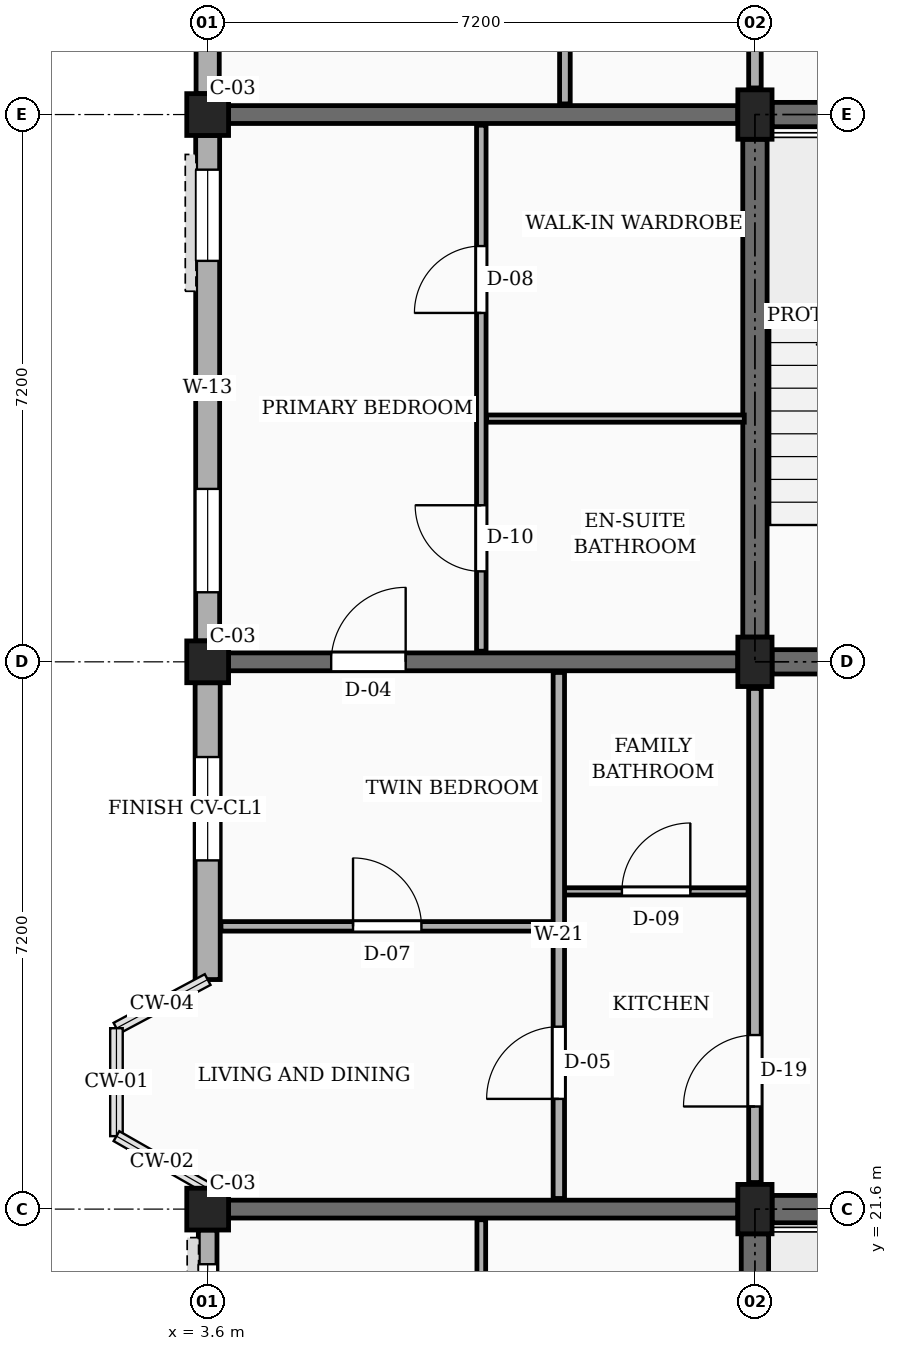
"""IFC4 building model, lengths in metres.
Left out: names, types, materials, properties, quantities, classifications, styles, units other than length and angle.
Written with IfcOpenShell. Run it as: python <this file> out.ifc"""

import sys

from ifc_helpers import new_model, si_unit, direction, frame, frame_2d, origin, origin_2d, place, context, subcontext, project, spatial, rectangle, extrude, element, fill, save


model = new_model("IFC4")
c1 = context("Model", 3, precision=1e-05, world=origin(), true_north=direction((0.0, 1.0)))
c2 = subcontext(c1, "Body", "Model", "MODEL_VIEW")
j1 = project(units=[si_unit("LENGTHUNIT", "METRE"), si_unit("PLANEANGLEUNIT", "RADIAN")], contexts=[c1])
p1 = place(None, origin())
s1 = spatial("IfcSite", under=j1, at=p1, CompositionType="ELEMENT")
p2 = place(p1, origin())
s2 = spatial("IfcBuilding", under=s1, at=p2, CompositionType="ELEMENT")
p3 = place(p2, frame((0.0, 0.0, 17.1)))
s3 = spatial("IfcBuildingStorey", under=s2, at=p3, CompositionType="ELEMENT", Elevation=17.1)
for number, where, z_axis, x_axis in (
    (1, (3.6, 21.6, 0.0), (0.0, 0.0, 1.0), (1.0, 0.0, 0.0)),
    (2, (3.6, 28.8, 0.0), (0.0, 0.0, 1.0), (1.0, 0.0, 0.0)),
    (3, (3.6, 36.0, 0.0), (0.0, 0.0, 1.0), (1.0, 0.0, 0.0)),
):
    element("IfcColumn", number, at=place(p3, frame(where, z_axis=z_axis, x_axis=x_axis)), inside=s3, PredefinedType="COLUMN", context=c2, shape_type="SweptSolid", body=[
        extrude(rectangle(XDim=0.55, YDim=0.55, at=origin_2d()), origin(), (0.0, 0.0, 1.0), 3.15),
    ])
for number, where, z_axis, x_axis in (
    (4, (10.8, 21.6, 0.0), (0.0, 0.0, 1.0), (1.0, 0.0, 0.0)),
    (5, (10.8, 28.8, 0.0), (0.0, 0.0, 1.0), (1.0, 0.0, 0.0)),
    (6, (10.8, 36.0, 0.0), (0.0, 0.0, 1.0), (1.0, 0.0, 0.0)),
):
    element("IfcColumn", number, at=place(p3, frame(where, z_axis=z_axis, x_axis=x_axis)), inside=s3, PredefinedType="COLUMN", context=c2, shape_type="SweptSolid", body=[
        extrude(rectangle(XDim=0.45, YDim=0.65, at=origin_2d()), origin(), (0.0, 0.0, 1.0), 3.15),
    ])
p4 = place(p3, frame((3.875, 21.6, 0.0), z_axis=(0.0, 0.0, 1.0), x_axis=(1.0, 0.0, 0.0)))
e7 = element("IfcWall", 7, at=p4, inside=s3, PredefinedType="SOLIDWALL", context=c2, shape_type="SweptSolid", body=[
    extrude(rectangle(XDim=6.7, YDim=0.235, at=frame_2d((3.35, 0.0))), origin(), (0.0, 0.0, 1.0), 2.17),
])
p5 = place(p3, frame((3.875, 28.8, 0.0), z_axis=(0.0, 0.0, 1.0), x_axis=(1.0, 0.0, 0.0)))
e8 = element("IfcWall", 8, at=p5, inside=s3, PredefinedType="SOLIDWALL", context=c2, shape_type="SweptSolid", body=[
    extrude(rectangle(XDim=6.7, YDim=0.235, at=frame_2d((3.35, 0.0))), origin(), (0.0, 0.0, 1.0), 2.17),
])
p6 = place(p5, frame((1.35, 0.0, 0.0)))
e9 = element("IfcOpeningElement", 9, at=p6, cuts=e8, PredefinedType="OPENING", context=c2, shape_type="SweptSolid", body=[
    extrude(rectangle(XDim=0.98, YDim=2.12, at=frame_2d((0.49, 1.06))), frame((0.0, 0.127, 0.0), z_axis=(0.0, -1.0, 0.0), x_axis=(1.0, 0.0, 0.0)), (0.0, 0.0, 1.0), 0.255),
])
p7 = place(p3, frame((3.875, 36.0, 0.0), z_axis=(0.0, 0.0, 1.0), x_axis=(1.0, 0.0, 0.0)))
e10 = element("IfcWall", 10, at=p7, inside=s3, PredefinedType="SOLIDWALL", context=c2, shape_type="SweptSolid", body=[
    extrude(rectangle(XDim=6.7, YDim=0.235, at=frame_2d((3.35, 0.0))), origin(), (0.0, 0.0, 1.0), 2.17),
])
p8 = place(p3, frame((3.6, 42.925, 0.0), z_axis=(0.0, 0.0, 1.0), x_axis=(0.0, -1.0, 0.0)))
e11 = element("IfcWall", 11, at=p8, inside=s3, PredefinedType="SOLIDWALL", context=c2, shape_type="SweptSolid", body=[
    extrude(rectangle(XDim=6.65, YDim=0.305, at=frame_2d((3.325, 0.0))), origin(), (0.0, 0.0, 1.0), 2.44),
])
p9 = place(p8, frame((0.45, 0.0, 0.78)))
e12 = element("IfcOpeningElement", 12, at=p9, cuts=e11, PredefinedType="OPENING", context=c2, shape_type="SweptSolid", body=[
    extrude(rectangle(XDim=1.04, YDim=1.26, at=frame_2d((0.52, 0.63))), frame((0.0, 0.163, 0.0), z_axis=(0.0, -1.0, 0.0), x_axis=(1.0, 0.0, 0.0)), (0.0, 0.0, 1.0), 0.325),
])
p10 = place(p8, frame((4.65, 0.0, 0.78)))
e13 = element("IfcOpeningElement", 13, at=p10, cuts=e11, PredefinedType="OPENING", context=c2, shape_type="SweptSolid", body=[
    extrude(rectangle(XDim=1.2, YDim=1.26, at=frame_2d((0.6, 0.63))), frame((0.0, 0.163, 0.0), z_axis=(0.0, -1.0, 0.0), x_axis=(1.0, 0.0, 0.0)), (0.0, 0.0, 1.0), 0.325),
])
p11 = place(p3, frame((3.6, 35.725, 0.0), z_axis=(0.0, 0.0, 1.0), x_axis=(0.0, -1.0, 0.0)))
e14 = element("IfcWall", 14, at=p11, inside=s3, PredefinedType="SOLIDWALL", context=c2, shape_type="SweptSolid", body=[
    extrude(rectangle(XDim=6.65, YDim=0.315, at=frame_2d((3.325, 0.0))), origin(), (0.0, 0.0, 1.0), 2.44),
])
p12 = place(p11, frame((0.45, 0.0, 0.78)))
e15 = element("IfcOpeningElement", 15, at=p12, cuts=e14, PredefinedType="OPENING", context=c2, shape_type="SweptSolid", body=[
    extrude(rectangle(XDim=1.2, YDim=1.26, at=frame_2d((0.6, 0.63))), frame((0.0, 0.167, 0.0), z_axis=(0.0, -1.0, 0.0), x_axis=(1.0, 0.0, 0.0)), (0.0, 0.0, 1.0), 0.335),
])
p13 = place(p11, frame((4.65, 0.0, 0.78)))
e16 = element("IfcOpeningElement", 16, at=p13, cuts=e14, PredefinedType="OPENING", context=c2, shape_type="SweptSolid", body=[
    extrude(rectangle(XDim=1.36, YDim=1.26, at=frame_2d((0.68, 0.63))), frame((0.0, 0.167, 0.0), z_axis=(0.0, -1.0, 0.0), x_axis=(1.0, 0.0, 0.0)), (0.0, 0.0, 1.0), 0.335),
])
p14 = place(p3, frame((3.6, 28.525, 0.0), z_axis=(0.0, 0.0, 1.0), x_axis=(0.0, -1.0, 0.0)))
e17 = element("IfcWall", 17, at=p14, inside=s3, PredefinedType="SOLIDWALL", context=c2, shape_type="SweptSolid", body=[
    extrude(rectangle(XDim=3.905, YDim=0.33, at=frame_2d((1.952, 0.0))), origin(), (0.0, 0.0, 1.0), 2.44),
])
p15 = place(p14, frame((0.978, 0.0, 0.78)))
e18 = element("IfcOpeningElement", 18, at=p15, cuts=e17, PredefinedType="OPENING", context=c2, shape_type="SweptSolid", body=[
    extrude(rectangle(XDim=1.36, YDim=1.26, at=frame_2d((0.68, 0.63))), frame((0.0, 0.175, 0.0), z_axis=(0.0, -1.0, 0.0), x_axis=(1.0, 0.0, 0.0)), (0.0, 0.0, 1.0), 0.35),
])
p16 = place(p3, frame((3.6, 21.325, 0.0), z_axis=(0.0, 0.0, 1.0), x_axis=(0.0, -1.0, 0.0)))
e19 = element("IfcWall", 19, at=p16, inside=s3, PredefinedType="SOLIDWALL", context=c2, shape_type="SweptSolid", body=[
    extrude(rectangle(XDim=6.65, YDim=0.245, at=frame_2d((3.325, 0.0))), origin(), (0.0, 0.0, 1.0), 2.44),
])
p17 = place(p16, frame((0.45, 0.0, 0.78)))
e20 = element("IfcOpeningElement", 20, at=p17, cuts=e19, PredefinedType="OPENING", context=c2, shape_type="SweptSolid", body=[
    extrude(rectangle(XDim=1.44, YDim=1.26, at=frame_2d((0.72, 0.63))), frame((0.0, 0.133, 0.0), z_axis=(0.0, -1.0, 0.0), x_axis=(1.0, 0.0, 0.0)), (0.0, 0.0, 1.0), 0.265),
])
p18 = place(p16, frame((4.65, 0.0, 0.78)))
e21 = element("IfcOpeningElement", 21, at=p18, cuts=e19, PredefinedType="OPENING", context=c2, shape_type="SweptSolid", body=[
    extrude(rectangle(XDim=0.98, YDim=1.36, at=frame_2d((0.49, 0.68))), frame((0.0, 0.133, 0.0), z_axis=(0.0, -1.0, 0.0), x_axis=(1.0, 0.0, 0.0)), (0.0, 0.0, 1.0), 0.265),
])
p19 = place(p3, frame((10.8, 14.725, 0.0), z_axis=(0.0, 0.0, 1.0), x_axis=(0.0, 1.0, 0.0)))
e22 = element("IfcWall", 22, at=p19, inside=s3, PredefinedType="SHEAR", context=c2, shape_type="SweptSolid", body=[
    extrude(rectangle(XDim=6.55, YDim=0.36, at=frame_2d((3.275, 0.0))), origin(), (0.0, 0.0, 1.0), 2.87),
])
p20 = place(p3, frame((11.025, 21.6, 0.0), z_axis=(0.0, 0.0, 1.0), x_axis=(1.0, 0.0, 0.0)))
e23 = element("IfcWall", 23, at=p20, inside=s3, PredefinedType="SHEAR", context=c2, shape_type="SweptSolid", body=[
    extrude(rectangle(XDim=6.75, YDim=0.36, at=frame_2d((3.375, 0.0))), origin(), (0.0, 0.0, 1.0), 2.87),
])
p21 = place(p3, frame((10.8, 29.125, 0.0), z_axis=(0.0, 0.0, 1.0), x_axis=(0.0, 1.0, 0.0)))
e24 = element("IfcWall", 24, at=p21, inside=s3, PredefinedType="SHEAR", context=c2, shape_type="SweptSolid", body=[
    extrude(rectangle(XDim=6.55, YDim=0.32, at=frame_2d((3.275, 0.0))), origin(), (0.0, 0.0, 1.0), 2.87),
])
for number, where, z_axis, x_axis in (
    (25, (11.025, 36.0, 0.0), (0.0, 0.0, 1.0), (1.0, 0.0, 0.0)),
    (26, (11.025, 28.8, 0.0), (0.0, 0.0, 1.0), (1.0, 0.0, 0.0)),
):
    element("IfcWall", number, at=place(p3, frame(where, z_axis=z_axis, x_axis=x_axis)), inside=s3, PredefinedType="SHEAR", context=c2, shape_type="SweptSolid", body=[
        extrude(rectangle(XDim=6.75, YDim=0.32, at=frame_2d((3.375, 0.0))), origin(), (0.0, 0.0, 1.0), 2.87),
    ])
p22 = place(p3, frame((10.8, 21.95, 0.0), z_axis=(0.0, 0.0, 1.0), x_axis=(0.0, 1.0, 0.0)))
e27 = element("IfcWall", 27, at=p22, inside=s3, PredefinedType="PARTITIONING", context=c2, shape_type="SweptSolid", body=[
    extrude(rectangle(XDim=6.5, YDim=0.165, at=frame_2d((3.25, 0.0))), origin(), (0.0, 0.0, 1.0), 2.305),
])
p23 = place(p22, frame((1.0, 0.0, 0.0)))
e28 = element("IfcOpeningElement", 28, at=p23, cuts=e27, PredefinedType="OPENING", context=c2, shape_type="SweptSolid", body=[
    extrude(rectangle(XDim=0.94, YDim=2.12, at=frame_2d((0.47, 1.06))), frame((0.0, 0.093, 0.0), z_axis=(0.0, -1.0, 0.0), x_axis=(1.0, 0.0, 0.0)), (0.0, 0.0, 1.0), 0.185),
])
p24 = place(p3, frame((10.8, 36.35, 0.0), z_axis=(0.0, 0.0, 1.0), x_axis=(0.0, 1.0, 0.0)))
e29 = element("IfcWall", 29, at=p24, inside=s3, PredefinedType="PARTITIONING", context=c2, shape_type="SweptSolid", body=[
    extrude(rectangle(XDim=6.5, YDim=0.165, at=frame_2d((3.25, 0.0))), origin(), (0.0, 0.0, 1.0), 2.305),
])
p25 = place(p24, frame((1.0, 0.0, 0.0)))
e30 = element("IfcOpeningElement", 30, at=p25, cuts=e29, PredefinedType="OPENING", context=c2, shape_type="SweptSolid", body=[
    extrude(rectangle(XDim=1.14, YDim=2.18, at=frame_2d((0.57, 1.09))), frame((0.0, 0.093, 0.0), z_axis=(0.0, -1.0, 0.0), x_axis=(1.0, 0.0, 0.0)), (0.0, 0.0, 1.0), 0.185),
])
p26 = place(p3, frame((7.2, 14.54, 0.0), z_axis=(0.0, 0.0, 1.0), x_axis=(0.0, 1.0, 0.0)))
e31 = element("IfcWall", 31, at=p26, inside=s3, PredefinedType="PARTITIONING", context=c2, shape_type="SweptSolid", body=[
    extrude(rectangle(XDim=6.92, YDim=0.115, at=frame_2d((3.46, 0.0))), origin(), (0.0, 0.0, 1.0), 2.305),
])
p27 = place(p26, frame((1.05, 0.0, 0.0)))
e32 = element("IfcOpeningElement", 32, at=p27, cuts=e31, PredefinedType="OPENING", context=c2, shape_type="SweptSolid", body=[
    extrude(rectangle(XDim=0.87, YDim=2.05, at=frame_2d((0.435, 1.025))), frame((0.0, 0.067, 0.0), z_axis=(0.0, -1.0, 0.0), x_axis=(1.0, 0.0, 0.0)), (0.0, 0.0, 1.0), 0.135),
])
p28 = place(p26, frame((4.45, 0.0, 0.0)))
e33 = element("IfcOpeningElement", 33, at=p28, cuts=e31, PredefinedType="OPENING", context=c2, shape_type="SweptSolid", body=[
    extrude(rectangle(XDim=0.88, YDim=2.08, at=frame_2d((0.44, 1.04))), frame((0.0, 0.067, 0.0), z_axis=(0.0, -1.0, 0.0), x_axis=(1.0, 0.0, 0.0)), (0.0, 0.0, 1.0), 0.135),
])
p29 = place(p3, frame((3.775, 25.32, 0.0), z_axis=(0.0, 0.0, 1.0), x_axis=(1.0, 0.0, 0.0)))
e34 = element("IfcWall", 34, at=p29, inside=s3, PredefinedType="PARTITIONING", context=c2, shape_type="SweptSolid", body=[
    extrude(rectangle(XDim=4.375, YDim=0.125, at=frame_2d((2.188, 0.0))), origin(), (0.0, 0.0, 1.0), 2.305),
])
p30 = place(p29, frame((1.738, 0.0, 0.0)))
e35 = element("IfcOpeningElement", 35, at=p30, cuts=e34, PredefinedType="OPENING", context=c2, shape_type="SweptSolid", body=[
    extrude(rectangle(XDim=0.9, YDim=2.1, at=frame_2d((0.45, 1.05))), frame((0.0, 0.073, 0.0), z_axis=(0.0, -1.0, 0.0), x_axis=(1.0, 0.0, 0.0)), (0.0, 0.0, 1.0), 0.145),
])
p31 = place(p3, frame((8.29, 25.78, 0.0), z_axis=(0.0, 0.0, 1.0), x_axis=(1.0, 0.0, 0.0)))
e36 = element("IfcWall", 36, at=p31, inside=s3, PredefinedType="PARTITIONING", context=c2, shape_type="SweptSolid", body=[
    extrude(rectangle(XDim=2.42, YDim=0.095, at=frame_2d((1.21, 0.0))), origin(), (0.0, 0.0, 1.0), 2.305),
])
p32 = place(p31, frame((0.76, 0.0, 0.0)))
e37 = element("IfcOpeningElement", 37, at=p32, cuts=e36, PredefinedType="OPENING", context=c2, shape_type="SweptSolid", body=[
    extrude(rectangle(XDim=0.9, YDim=2.05, at=frame_2d((0.45, 1.025))), frame((0.0, 0.058, 0.0), z_axis=(0.0, -1.0, 0.0), x_axis=(1.0, 0.0, 0.0)), (0.0, 0.0, 1.0), 0.115),
])
p33 = place(p3, frame((8.22, 21.74, 0.0), z_axis=(0.0, 0.0, 1.0), x_axis=(0.0, 1.0, 0.0)))
e38 = element("IfcWall", 38, at=p33, inside=s3, PredefinedType="PARTITIONING", context=c2, shape_type="SweptSolid", body=[
    extrude(rectangle(XDim=6.92, YDim=0.15, at=frame_2d((3.46, 0.0))), origin(), (0.0, 0.0, 1.0), 2.305),
])
p34 = place(p33, frame((1.31, 0.0, 0.0)))
e39 = element("IfcOpeningElement", 39, at=p34, cuts=e38, PredefinedType="OPENING", context=c2, shape_type="SweptSolid", body=[
    extrude(rectangle(XDim=0.95, YDim=2.1, at=frame_2d((0.475, 1.05))), frame((0.0, 0.085, 0.0), z_axis=(0.0, -1.0, 0.0), x_axis=(1.0, 0.0, 0.0)), (0.0, 0.0, 1.0), 0.17),
])
p35 = place(p3, frame((7.2, 28.94, 0.0), z_axis=(0.0, 0.0, 1.0), x_axis=(0.0, 1.0, 0.0)))
e40 = element("IfcWall", 40, at=p35, inside=s3, PredefinedType="PARTITIONING", context=c2, shape_type="SweptSolid", body=[
    extrude(rectangle(XDim=6.92, YDim=0.125, at=frame_2d((3.46, 0.0))), origin(), (0.0, 0.0, 1.0), 2.305),
])
p36 = place(p35, frame((1.05, 0.0, 0.0)))
e41 = element("IfcOpeningElement", 41, at=p36, cuts=e40, PredefinedType="OPENING", context=c2, shape_type="SweptSolid", body=[
    extrude(rectangle(XDim=0.87, YDim=2.05, at=frame_2d((0.435, 1.025))), frame((0.0, 0.073, 0.0), z_axis=(0.0, -1.0, 0.0), x_axis=(1.0, 0.0, 0.0)), (0.0, 0.0, 1.0), 0.145),
])
p37 = place(p35, frame((4.45, 0.0, 0.0)))
e42 = element("IfcOpeningElement", 42, at=p37, cuts=e40, PredefinedType="OPENING", context=c2, shape_type="SweptSolid", body=[
    extrude(rectangle(XDim=0.88, YDim=2.08, at=frame_2d((0.44, 1.04))), frame((0.0, 0.073, 0.0), z_axis=(0.0, -1.0, 0.0), x_axis=(1.0, 0.0, 0.0)), (0.0, 0.0, 1.0), 0.145),
])
p38 = place(p3, frame((7.27, 32.0, 0.0), z_axis=(0.0, 0.0, 1.0), x_axis=(1.0, 0.0, 0.0)))
e43 = element("IfcWall", 43, at=p38, inside=s3, PredefinedType="PARTITIONING", context=c2, shape_type="SweptSolid", body=[
    extrude(rectangle(XDim=3.39, YDim=0.095, at=frame_2d((1.695, 0.0))), origin(), (0.0, 0.0, 1.0), 2.305),
])
p39 = place(p3, frame((8.3, 36.14, 0.0), z_axis=(0.0, 0.0, 1.0), x_axis=(0.0, 1.0, 0.0)))
e44 = element("IfcWall", 44, at=p39, inside=s3, PredefinedType="PARTITIONING", context=c2, shape_type="SweptSolid", body=[
    extrude(rectangle(XDim=6.92, YDim=0.14, at=frame_2d((3.46, 0.0))), origin(), (0.0, 0.0, 1.0), 2.305),
])
p40 = place(p39, frame((1.31, 0.0, 0.0)))
e45 = element("IfcOpeningElement", 45, at=p40, cuts=e44, PredefinedType="OPENING", context=c2, shape_type="SweptSolid", body=[
    extrude(rectangle(XDim=0.95, YDim=2.1, at=frame_2d((0.475, 1.05))), frame((0.0, 0.08, 0.0), z_axis=(0.0, -1.0, 0.0), x_axis=(1.0, 0.0, 0.0)), (0.0, 0.0, 1.0), 0.16),
])
p41 = place(p12, origin())
e46 = element("IfcWindow", 46, at=p41, inside=s3, PartitioningType="SINGLE_PANEL", PredefinedType="WINDOW", context=c2, shape_type="SweptSolid", body=[
    extrude(rectangle(XDim=1.2, YDim=1.26, at=frame_2d((0.6, 0.63))), frame((0.0, 0.03, 0.0), z_axis=(0.0, -1.0, 0.0), x_axis=(1.0, 0.0, 0.0)), (0.0, 0.0, 1.0), 0.06),
])
fill(e15, e46)
p42 = place(p13, origin())
e47 = element("IfcWindow", 47, at=p42, inside=s3, PartitioningType="SINGLE_PANEL", PredefinedType="WINDOW", context=c2, shape_type="SweptSolid", body=[
    extrude(rectangle(XDim=1.36, YDim=1.26, at=frame_2d((0.68, 0.63))), frame((0.0, 0.03, 0.0), z_axis=(0.0, -1.0, 0.0), x_axis=(1.0, 0.0, 0.0)), (0.0, 0.0, 1.0), 0.06),
])
fill(e16, e47)
p43 = place(p15, origin())
e48 = element("IfcWindow", 48, at=p43, inside=s3, PartitioningType="SINGLE_PANEL", PredefinedType="WINDOW", context=c2, shape_type="SweptSolid", body=[
    extrude(rectangle(XDim=1.36, YDim=1.26, at=frame_2d((0.68, 0.63))), frame((0.0, 0.03, 0.0), z_axis=(0.0, -1.0, 0.0), x_axis=(1.0, 0.0, 0.0)), (0.0, 0.0, 1.0), 0.06),
])
fill(e18, e48)
p44 = place(p17, origin())
e49 = element("IfcWindow", 49, at=p44, inside=s3, PartitioningType="SINGLE_PANEL", PredefinedType="WINDOW", context=c2, shape_type="SweptSolid", body=[
    extrude(rectangle(XDim=1.44, YDim=1.26, at=frame_2d((0.72, 0.63))), frame((0.0, 0.03, 0.0), z_axis=(0.0, -1.0, 0.0), x_axis=(1.0, 0.0, 0.0)), (0.0, 0.0, 1.0), 0.06),
])
fill(e20, e49)
p45 = place(p23, origin())
e50 = element("IfcDoor", 50, at=p45, inside=s3, OperationType="SINGLE_SWING_LEFT", PredefinedType="DOOR", context=c2, shape_type="SweptSolid", body=[
    extrude(rectangle(XDim=0.94, YDim=2.12, at=frame_2d((0.47, 1.06))), frame((0.0, 0.025, 0.0), z_axis=(0.0, -1.0, 0.0), x_axis=(1.0, 0.0, 0.0)), (0.0, 0.0, 1.0), 0.05),
])
fill(e28, e50)
p46 = place(p30, origin())
e51 = element("IfcDoor", 51, at=p46, inside=s3, OperationType="SINGLE_SWING_LEFT", PredefinedType="DOOR", context=c2, shape_type="SweptSolid", body=[
    extrude(rectangle(XDim=0.9, YDim=2.1, at=frame_2d((0.45, 1.05))), frame((0.0, 0.025, 0.0), z_axis=(0.0, -1.0, 0.0), x_axis=(1.0, 0.0, 0.0)), (0.0, 0.0, 1.0), 0.05),
])
fill(e35, e51)
p47 = place(p32, origin())
e52 = element("IfcDoor", 52, at=p47, inside=s3, OperationType="SINGLE_SWING_RIGHT", PredefinedType="DOOR", context=c2, shape_type="SweptSolid", body=[
    extrude(rectangle(XDim=0.9, YDim=2.05, at=frame_2d((0.45, 1.025))), frame((0.0, 0.025, 0.0), z_axis=(0.0, -1.0, 0.0), x_axis=(1.0, 0.0, 0.0)), (0.0, 0.0, 1.0), 0.05),
])
fill(e37, e52)
p48 = place(p34, origin())
e53 = element("IfcDoor", 53, at=p48, inside=s3, OperationType="SINGLE_SWING_LEFT", PredefinedType="DOOR", context=c2, shape_type="SweptSolid", body=[
    extrude(rectangle(XDim=0.95, YDim=2.1, at=frame_2d((0.475, 1.05))), frame((0.0, 0.025, 0.0), z_axis=(0.0, -1.0, 0.0), x_axis=(1.0, 0.0, 0.0)), (0.0, 0.0, 1.0), 0.05),
])
fill(e39, e53)
p49 = place(p36, origin())
e54 = element("IfcDoor", 54, at=p49, inside=s3, OperationType="SINGLE_SWING_RIGHT", PredefinedType="DOOR", context=c2, shape_type="SweptSolid", body=[
    extrude(rectangle(XDim=0.87, YDim=2.05, at=frame_2d((0.435, 1.025))), frame((0.0, 0.025, 0.0), z_axis=(0.0, -1.0, 0.0), x_axis=(1.0, 0.0, 0.0)), (0.0, 0.0, 1.0), 0.05),
])
fill(e41, e54)
p50 = place(p37, origin())
e55 = element("IfcDoor", 55, at=p50, inside=s3, OperationType="SINGLE_SWING_LEFT", PredefinedType="DOOR", context=c2, shape_type="SweptSolid", body=[
    extrude(rectangle(XDim=0.88, YDim=2.08, at=frame_2d((0.44, 1.04))), frame((0.0, 0.025, 0.0), z_axis=(0.0, -1.0, 0.0), x_axis=(1.0, 0.0, 0.0)), (0.0, 0.0, 1.0), 0.05),
])
fill(e42, e55)
p51 = place(p6, origin())
e56 = element("IfcDoor", 56, at=p51, inside=s3, OperationType="SINGLE_SWING_RIGHT", PredefinedType="DOOR", context=c2, shape_type="SweptSolid", body=[
    extrude(rectangle(XDim=0.98, YDim=2.12, at=frame_2d((0.49, 1.06))), frame((0.0, 0.025, 0.0), z_axis=(0.0, -1.0, 0.0), x_axis=(1.0, 0.0, 0.0)), (0.0, 0.0, 1.0), 0.05),
])
fill(e9, e56)
save(model, sys.argv[1])
